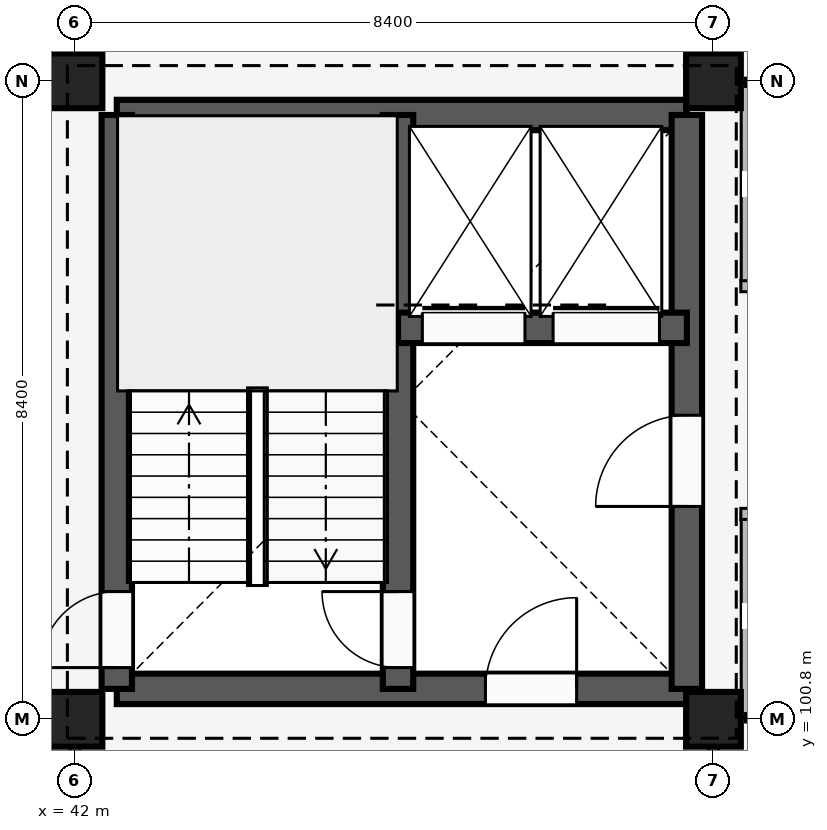
"""IFC4 building model, lengths in metres.
Left out: names, types, materials, properties, quantities, classifications, styles, units other than length and angle.
Written with IfcOpenShell. Run it as: python <this file> out.ifc"""

import sys

from ifc_helpers import new_model, si_unit, direction, frame, frame_2d, origin, origin_2d, place, context, subcontext, project, spatial, rectangle, extrude, element, fill, save


model = new_model("IFC4")
c1 = context("Model", 3, precision=1e-05, world=origin(), true_north=direction((0.0, 1.0)))
c2 = subcontext(c1, "Body", "Model", "MODEL_VIEW")
j1 = project(units=[si_unit("LENGTHUNIT", "METRE"), si_unit("PLANEANGLEUNIT", "RADIAN")], contexts=[c1])
p1 = place(None, origin())
s1 = spatial("IfcSite", under=j1, at=p1, CompositionType="ELEMENT")
p2 = place(p1, origin())
s2 = spatial("IfcBuilding", under=s1, at=p2, CompositionType="ELEMENT")
p3 = place(p2, frame((0.0, 0.0, 12.9)))
s3 = spatial("IfcBuildingStorey", under=s2, at=p3, CompositionType="ELEMENT", Elevation=12.9)
for number, where, z_axis, x_axis in (
    (1, (42.0, 100.8, 0.0), (0.0, 0.0, 1.0), (1.0, 0.0, 0.0)),
    (2, (42.0, 109.2, 0.0), (0.0, 0.0, 1.0), (1.0, 0.0, 0.0)),
    (3, (50.4, 100.8, 0.0), (0.0, 0.0, 1.0), (1.0, 0.0, 0.0)),
    (4, (50.4, 109.2, 0.0), (0.0, 0.0, 1.0), (1.0, 0.0, 0.0)),
):
    element("IfcColumn", number, at=place(p3, frame(where, z_axis=z_axis, x_axis=x_axis)), inside=s3, PredefinedType="COLUMN", context=c2, shape_type="SweptSolid", body=[
        extrude(rectangle(XDim=0.72, YDim=0.72, at=origin_2d()), origin(), (0.0, 0.0, 1.0), 3.3),
    ])
p4 = place(p3, frame((42.55, 101.2, 0.0), z_axis=(0.0, 0.0, 1.0), x_axis=(1.0, 0.0, 0.0)))
e5 = element("IfcWall", 5, at=p4, inside=s3, PredefinedType="SHEAR", context=c2, shape_type="SweptSolid", body=[
    extrude(rectangle(XDim=7.5, YDim=0.4, at=frame_2d((3.75, 0.0))), origin(), (0.0, 0.0, 1.0), 3.02),
])
p5 = place(p4, frame((4.85, 0.0, 0.0)))
e6 = element("IfcOpeningElement", 6, at=p5, cuts=e5, PredefinedType="OPENING", context=c2, shape_type="SweptSolid", body=[
    extrude(rectangle(XDim=1.2, YDim=2.2, at=frame_2d((0.6, 1.1))), frame((0.0, 0.21, 0.0), z_axis=(0.0, -1.0, 0.0), x_axis=(1.0, 0.0, 0.0)), (0.0, 0.0, 1.0), 0.42),
])
p6 = place(p3, frame((42.55, 108.75, 0.0), z_axis=(0.0, 0.0, 1.0), x_axis=(1.0, 0.0, 0.0)))
e7 = element("IfcWall", 7, at=p6, inside=s3, PredefinedType="SHEAR", context=c2, shape_type="SweptSolid", body=[
    extrude(rectangle(XDim=7.5, YDim=0.4, at=frame_2d((3.75, 0.0))), origin(), (0.0, 0.0, 1.0), 3.02),
])
p7 = place(p3, frame((42.55, 101.2, 0.0), z_axis=(0.0, 0.0, 1.0), x_axis=(0.0, 1.0, 0.0)))
e8 = element("IfcWall", 8, at=p7, inside=s3, PredefinedType="SHEAR", context=c2, shape_type="SweptSolid", body=[
    extrude(rectangle(XDim=7.55, YDim=0.4, at=frame_2d((3.775, 0.0))), origin(), (0.0, 0.0, 1.0), 3.02),
])
p8 = place(p7, frame((0.28, 0.0, 0.0)))
e9 = element("IfcOpeningElement", 9, at=p8, cuts=e8, PredefinedType="OPENING", context=c2, shape_type="SweptSolid", body=[
    extrude(rectangle(XDim=1.0, YDim=2.15, at=frame_2d((0.5, 1.075))), frame((0.0, 0.21, 0.0), z_axis=(0.0, -1.0, 0.0), x_axis=(1.0, 0.0, 0.0)), (0.0, 0.0, 1.0), 0.42),
])
p9 = place(p3, frame((50.05, 101.2, 0.0), z_axis=(0.0, 0.0, 1.0), x_axis=(0.0, 1.0, 0.0)))
e10 = element("IfcWall", 10, at=p9, inside=s3, PredefinedType="SHEAR", context=c2, shape_type="SweptSolid", body=[
    extrude(rectangle(XDim=7.55, YDim=0.4, at=frame_2d((3.775, 0.0))), origin(), (0.0, 0.0, 1.0), 3.02),
])
p10 = place(p9, frame((2.4, 0.0, 0.0)))
e11 = element("IfcOpeningElement", 11, at=p10, cuts=e10, PredefinedType="OPENING", context=c2, shape_type="SweptSolid", body=[
    extrude(rectangle(XDim=1.2, YDim=2.2, at=frame_2d((0.6, 1.1))), frame((0.0, 0.21, 0.0), z_axis=(0.0, -1.0, 0.0), x_axis=(1.0, 0.0, 0.0)), (0.0, 0.0, 1.0), 0.42),
])
p11 = place(p3, frame((46.25, 101.2, 0.0), z_axis=(0.0, 0.0, 1.0), x_axis=(0.0, 1.0, 0.0)))
e12 = element("IfcWall", 12, at=p11, inside=s3, PredefinedType="SHEAR", context=c2, shape_type="SweptSolid", body=[
    extrude(rectangle(XDim=7.55, YDim=0.4, at=frame_2d((3.775, 0.0))), origin(), (0.0, 0.0, 1.0), 3.02),
])
p12 = place(p11, frame((0.28, 0.0, 0.0)))
e13 = element("IfcOpeningElement", 13, at=p12, cuts=e12, PredefinedType="OPENING", context=c2, shape_type="SweptSolid", body=[
    extrude(rectangle(XDim=1.0, YDim=2.15, at=frame_2d((0.5, 1.075))), frame((0.0, 0.21, 0.0), z_axis=(0.0, -1.0, 0.0), x_axis=(1.0, 0.0, 0.0)), (0.0, 0.0, 1.0), 0.42),
])
p13 = place(p3, frame((46.25, 105.95, 0.0), z_axis=(0.0, 0.0, 1.0), x_axis=(1.0, 0.0, 0.0)))
e14 = element("IfcWall", 14, at=p13, inside=s3, PredefinedType="SHEAR", context=c2, shape_type="SweptSolid", body=[
    extrude(rectangle(XDim=3.8, YDim=0.4, at=frame_2d((1.9, 0.0))), origin(), (0.0, 0.0, 1.0), 3.02),
])
p14 = place(p13, frame((0.32, 0.0, 0.0)))
e15 = element("IfcOpeningElement", 15, at=p14, cuts=e14, PredefinedType="OPENING", context=c2, shape_type="SweptSolid", body=[
    extrude(rectangle(XDim=1.35, YDim=2.25, at=frame_2d((0.675, 1.125))), frame((0.0, 0.21, 0.0), z_axis=(0.0, -1.0, 0.0), x_axis=(1.0, 0.0, 0.0)), (0.0, 0.0, 1.0), 0.42),
])
p15 = place(p13, frame((2.04, 0.0, 0.0)))
e16 = element("IfcOpeningElement", 16, at=p15, cuts=e14, PredefinedType="OPENING", context=c2, shape_type="SweptSolid", body=[
    extrude(rectangle(XDim=1.4, YDim=2.25, at=frame_2d((0.7, 1.125))), frame((0.0, 0.21, 0.0), z_axis=(0.0, -1.0, 0.0), x_axis=(1.0, 0.0, 0.0)), (0.0, 0.0, 1.0), 0.42),
])
p16 = place(p3, frame((42.0, 92.54, 0.0), z_axis=(0.0, 0.0, 1.0), x_axis=(0.0, 1.0, 0.0)))
e17 = element("IfcWall", 17, at=p16, inside=s3, PredefinedType="PARTITIONING", context=c2, shape_type="SweptSolid", body=[
    extrude(rectangle(XDim=8.21, YDim=0.13, at=frame_2d((4.105, 0.0))), origin(), (0.0, 0.0, 1.0), 2.42),
])
p17 = place(p16, frame((3.64, 0.0, 0.0)))
e18 = element("IfcOpeningElement", 18, at=p17, cuts=e17, PredefinedType="OPENING", context=c2, shape_type="SweptSolid", body=[
    extrude(rectangle(XDim=1.08, YDim=2.15, at=frame_2d((0.54, 1.075))), frame((0.0, 0.075, 0.0), z_axis=(0.0, -1.0, 0.0), x_axis=(1.0, 0.0, 0.0)), (0.0, 0.0, 1.0), 0.15),
])
p18 = place(p3, frame((42.0, 109.55, 0.0), z_axis=(0.0, 0.0, 1.0), x_axis=(0.0, 1.0, 0.0)))
e19 = element("IfcWall", 19, at=p18, inside=s3, PredefinedType="PARTITIONING", context=c2, shape_type="SweptSolid", body=[
    extrude(rectangle(XDim=7.91, YDim=0.13, at=frame_2d((3.955, 0.0))), origin(), (0.0, 0.0, 1.0), 2.42),
])
p19 = place(p18, frame((3.4, 0.0, 0.0)))
e20 = element("IfcOpeningElement", 20, at=p19, cuts=e19, PredefinedType="OPENING", context=c2, shape_type="SweptSolid", body=[
    extrude(rectangle(XDim=1.05, YDim=2.2, at=frame_2d((0.525, 1.1))), frame((0.0, 0.075, 0.0), z_axis=(0.0, -1.0, 0.0), x_axis=(1.0, 0.0, 0.0)), (0.0, 0.0, 1.0), 0.15),
])
p20 = place(p3, frame((50.4, 92.54, 0.0), z_axis=(0.0, 0.0, 1.0), x_axis=(0.0, 1.0, 0.0)))
e21 = element("IfcWall", 21, at=p20, inside=s3, PredefinedType="PARTITIONING", context=c2, shape_type="SweptSolid", body=[
    extrude(rectangle(XDim=8.21, YDim=0.13, at=frame_2d((4.105, 0.0))), origin(), (0.0, 0.0, 1.0), 2.42),
])
p21 = place(p20, frame((3.64, 0.0, 0.0)))
e22 = element("IfcOpeningElement", 22, at=p21, cuts=e21, PredefinedType="OPENING", context=c2, shape_type="SweptSolid", body=[
    extrude(rectangle(XDim=1.08, YDim=2.15, at=frame_2d((0.54, 1.075))), frame((0.0, 0.075, 0.0), z_axis=(0.0, -1.0, 0.0), x_axis=(1.0, 0.0, 0.0)), (0.0, 0.0, 1.0), 0.15),
])
p22 = place(p3, frame((50.4, 109.55, 0.0), z_axis=(0.0, 0.0, 1.0), x_axis=(0.0, 1.0, 0.0)))
e23 = element("IfcWall", 23, at=p22, inside=s3, PredefinedType="PARTITIONING", context=c2, shape_type="SweptSolid", body=[
    extrude(rectangle(XDim=7.91, YDim=0.13, at=frame_2d((3.955, 0.0))), origin(), (0.0, 0.0, 1.0), 2.42),
])
p23 = place(p22, frame((3.4, 0.0, 0.0)))
e24 = element("IfcOpeningElement", 24, at=p23, cuts=e23, PredefinedType="OPENING", context=c2, shape_type="SweptSolid", body=[
    extrude(rectangle(XDim=1.05, YDim=2.2, at=frame_2d((0.525, 1.1))), frame((0.0, 0.075, 0.0), z_axis=(0.0, -1.0, 0.0), x_axis=(1.0, 0.0, 0.0)), (0.0, 0.0, 1.0), 0.15),
])
p24 = place(p3, frame((50.76, 103.5, 0.0), z_axis=(0.0, 0.0, 1.0), x_axis=(1.0, 0.0, 0.0)))
e25 = element("IfcWall", 25, at=p24, inside=s3, PredefinedType="PARTITIONING", context=c2, shape_type="SweptSolid", body=[
    extrude(rectangle(XDim=7.96, YDim=0.15, at=frame_2d((3.98, 0.0))), origin(), (0.0, 0.0, 1.0), 2.42),
])
p25 = place(p24, frame((2.25, 0.0, 0.0)))
e26 = element("IfcOpeningElement", 26, at=p25, cuts=e25, PredefinedType="OPENING", context=c2, shape_type="SweptSolid", body=[
    extrude(rectangle(XDim=1.32, YDim=2.25, at=frame_2d((0.66, 1.125))), frame((0.0, 0.085, 0.0), z_axis=(0.0, -1.0, 0.0), x_axis=(1.0, 0.0, 0.0)), (0.0, 0.0, 1.0), 0.17),
])
p26 = place(p24, frame((5.95, 0.0, 0.0)))
e27 = element("IfcOpeningElement", 27, at=p26, cuts=e25, PredefinedType="OPENING", context=c2, shape_type="SweptSolid", body=[
    extrude(rectangle(XDim=1.32, YDim=2.25, at=frame_2d((0.66, 1.125))), frame((0.0, 0.085, 0.0), z_axis=(0.0, -1.0, 0.0), x_axis=(1.0, 0.0, 0.0)), (0.0, 0.0, 1.0), 0.17),
])
p27 = place(p3, frame((50.82, 100.82, 0.0), z_axis=(0.0, 0.0, 1.0), x_axis=(0.0, 1.0, 0.0)))
e28 = element("IfcWall", 28, at=p27, inside=s3, PredefinedType="PARTITIONING", context=c2, shape_type="SweptSolid", body=[
    extrude(rectangle(XDim=2.61, YDim=0.11, at=frame_2d((1.305, 0.0))), origin(), (0.0, 0.0, 1.0), 2.42),
])
p28 = place(p3, frame((50.82, 100.82, 0.0), z_axis=(0.0, 0.0, 1.0), x_axis=(1.0, 0.0, 0.0)))
e29 = element("IfcWall", 29, at=p28, inside=s3, PredefinedType="PARTITIONING", context=c2, shape_type="SweptSolid", body=[
    extrude(rectangle(XDim=1.98, YDim=0.11, at=frame_2d((0.99, 0.0))), origin(), (0.0, 0.0, 1.0), 2.42),
])
p29 = place(p28, frame((0.54, 0.0, 0.0)))
e30 = element("IfcOpeningElement", 30, at=p29, cuts=e29, PredefinedType="OPENING", context=c2, shape_type="SweptSolid", body=[
    extrude(rectangle(XDim=0.9, YDim=2.1, at=frame_2d((0.45, 1.05))), frame((0.0, 0.065, 0.0), z_axis=(0.0, -1.0, 0.0), x_axis=(1.0, 0.0, 0.0)), (0.0, 0.0, 1.0), 0.13),
])
p30 = place(p3, frame((58.72, 106.5, 0.0), z_axis=(0.0, 0.0, 1.0), x_axis=(-1.0, 0.0, 0.0)))
e31 = element("IfcWall", 31, at=p30, inside=s3, PredefinedType="PARTITIONING", context=c2, shape_type="SweptSolid", body=[
    extrude(rectangle(XDim=7.96, YDim=0.15, at=frame_2d((3.98, 0.0))), origin(), (0.0, 0.0, 1.0), 2.42),
])
p31 = place(p30, frame((0.73, 0.0, 0.0)))
e32 = element("IfcOpeningElement", 32, at=p31, cuts=e31, PredefinedType="OPENING", context=c2, shape_type="SweptSolid", body=[
    extrude(rectangle(XDim=1.32, YDim=2.25, at=frame_2d((0.66, 1.125))), frame((0.0, 0.085, 0.0), z_axis=(0.0, -1.0, 0.0), x_axis=(1.0, 0.0, 0.0)), (0.0, 0.0, 1.0), 0.17),
])
p32 = place(p30, frame((4.43, 0.0, 0.0)))
e33 = element("IfcOpeningElement", 33, at=p32, cuts=e31, PredefinedType="OPENING", context=c2, shape_type="SweptSolid", body=[
    extrude(rectangle(XDim=1.32, YDim=2.25, at=frame_2d((0.66, 1.125))), frame((0.0, 0.085, 0.0), z_axis=(0.0, -1.0, 0.0), x_axis=(1.0, 0.0, 0.0)), (0.0, 0.0, 1.0), 0.17),
])
p33 = place(p3, frame((50.82, 106.57, 0.0), z_axis=(0.0, 0.0, 1.0), x_axis=(0.0, 1.0, 0.0)))
e34 = element("IfcWall", 34, at=p33, inside=s3, PredefinedType="PARTITIONING", context=c2, shape_type="SweptSolid", body=[
    extrude(rectangle(XDim=2.61, YDim=0.11, at=frame_2d((1.305, 0.0))), origin(), (0.0, 0.0, 1.0), 2.42),
])
p34 = place(p3, frame((50.82, 109.18, 0.0), z_axis=(0.0, 0.0, 1.0), x_axis=(1.0, 0.0, 0.0)))
e35 = element("IfcWall", 35, at=p34, inside=s3, PredefinedType="PARTITIONING", context=c2, shape_type="SweptSolid", body=[
    extrude(rectangle(XDim=1.98, YDim=0.11, at=frame_2d((0.99, 0.0))), origin(), (0.0, 0.0, 1.0), 2.42),
])
p35 = place(p34, frame((0.54, 0.0, 0.0)))
e36 = element("IfcOpeningElement", 36, at=p35, cuts=e35, PredefinedType="OPENING", context=c2, shape_type="SweptSolid", body=[
    extrude(rectangle(XDim=0.9, YDim=2.1, at=frame_2d((0.45, 1.05))), frame((0.0, 0.065, 0.0), z_axis=(0.0, -1.0, 0.0), x_axis=(1.0, 0.0, 0.0)), (0.0, 0.0, 1.0), 0.13),
])
p36 = place(p10, origin())
e37 = element("IfcDoor", 37, at=p36, inside=s3, OperationType="SINGLE_SWING_LEFT", PredefinedType="DOOR", context=c2, shape_type="SweptSolid", body=[
    extrude(rectangle(XDim=1.2, YDim=2.2, at=frame_2d((0.6, 1.1))), frame((0.0, 0.025, 0.0), z_axis=(0.0, -1.0, 0.0), x_axis=(1.0, 0.0, 0.0)), (0.0, 0.0, 1.0), 0.05),
])
fill(e11, e37)
p37 = place(p5, origin())
e38 = element("IfcDoor", 38, at=p37, inside=s3, OperationType="SINGLE_SWING_RIGHT", PredefinedType="DOOR", context=c2, shape_type="SweptSolid", body=[
    extrude(rectangle(XDim=1.2, YDim=2.2, at=frame_2d((0.6, 1.1))), frame((0.0, 0.025, 0.0), z_axis=(0.0, -1.0, 0.0), x_axis=(1.0, 0.0, 0.0)), (0.0, 0.0, 1.0), 0.05),
])
fill(e6, e38)
p38 = place(p8, origin())
e39 = element("IfcDoor", 39, at=p38, inside=s3, OperationType="SINGLE_SWING_LEFT", PredefinedType="DOOR", context=c2, shape_type="SweptSolid", body=[
    extrude(rectangle(XDim=1.0, YDim=2.15, at=frame_2d((0.5, 1.075))), frame((0.0, 0.025, 0.0), z_axis=(0.0, -1.0, 0.0), x_axis=(1.0, 0.0, 0.0)), (0.0, 0.0, 1.0), 0.05),
])
fill(e9, e39)
p39 = place(p12, origin())
e40 = element("IfcDoor", 40, at=p39, inside=s3, OperationType="SINGLE_SWING_RIGHT", PredefinedType="DOOR", context=c2, shape_type="SweptSolid", body=[
    extrude(rectangle(XDim=1.0, YDim=2.15, at=frame_2d((0.5, 1.075))), frame((0.0, 0.025, 0.0), z_axis=(0.0, -1.0, 0.0), x_axis=(1.0, 0.0, 0.0)), (0.0, 0.0, 1.0), 0.05),
])
fill(e13, e40)
p40 = place(p14, origin())
e41 = element("IfcDoor", 41, at=p40, inside=s3, OperationType="SLIDING_TO_LEFT", PredefinedType="DOOR", context=c2, shape_type="SweptSolid", body=[
    extrude(rectangle(XDim=1.35, YDim=2.25, at=frame_2d((0.675, 1.125))), frame((0.0, 0.025, 0.0), z_axis=(0.0, -1.0, 0.0), x_axis=(1.0, 0.0, 0.0)), (0.0, 0.0, 1.0), 0.05),
])
fill(e15, e41)
p41 = place(p15, origin())
e42 = element("IfcDoor", 42, at=p41, inside=s3, OperationType="SLIDING_TO_LEFT", PredefinedType="DOOR", context=c2, shape_type="SweptSolid", body=[
    extrude(rectangle(XDim=1.4, YDim=2.25, at=frame_2d((0.7, 1.125))), frame((0.0, 0.025, 0.0), z_axis=(0.0, -1.0, 0.0), x_axis=(1.0, 0.0, 0.0)), (0.0, 0.0, 1.0), 0.05),
])
fill(e16, e42)
save(model, sys.argv[1])
